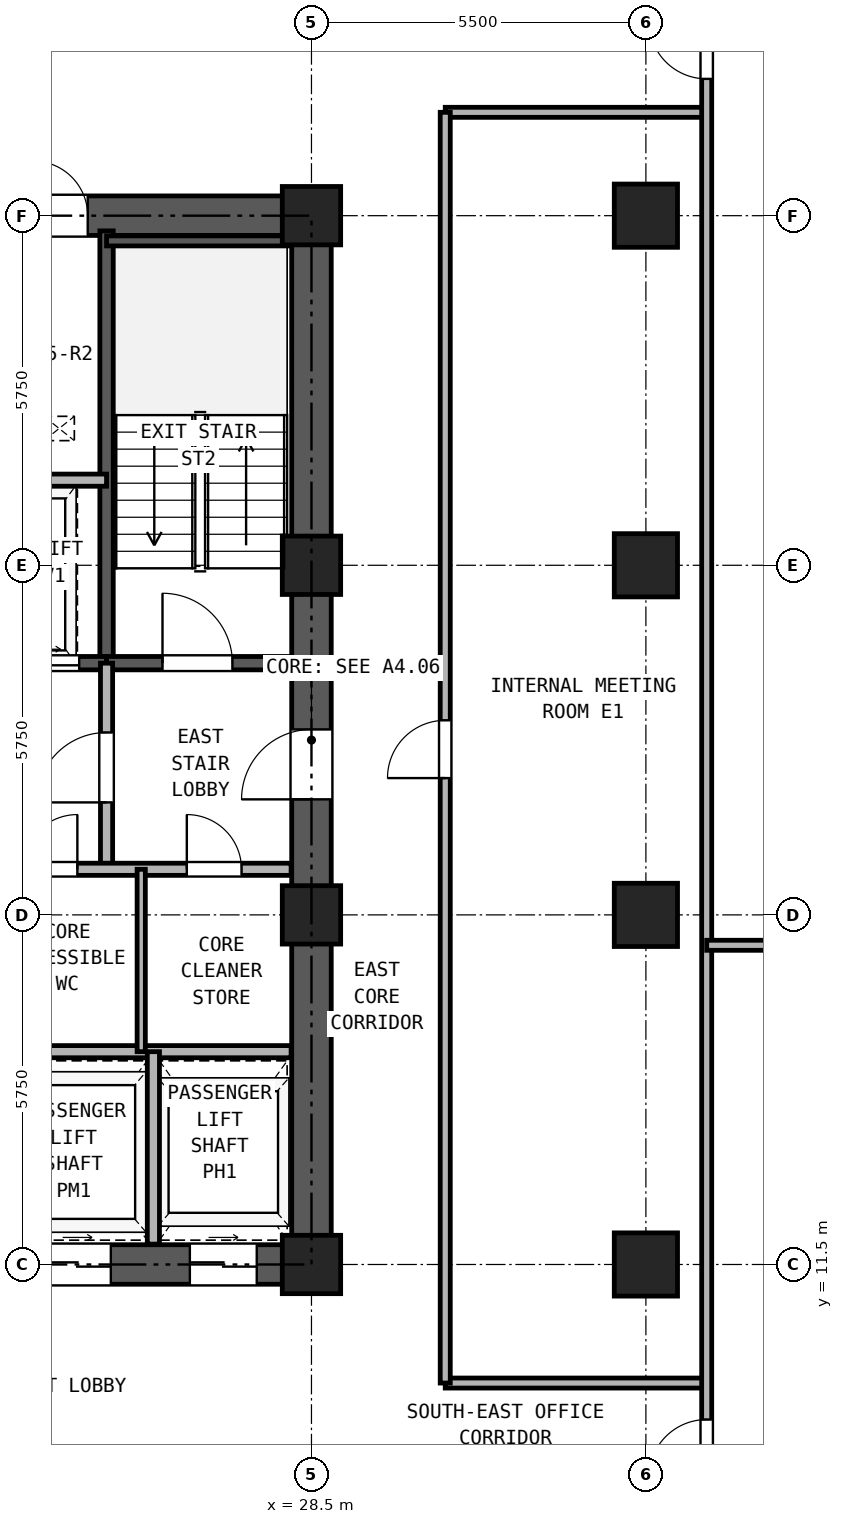
"""IFC4 building model, lengths in metres.
Left out: names, types, materials, properties, quantities, classifications, styles, units other than length and angle.
Written with IfcOpenShell. Run it as: python <this file> out.ifc"""

import sys

from ifc_helpers import new_model, si_unit, direction, frame, frame_2d, origin, origin_2d, place, context, subcontext, project, spatial, rectangle, hollow_rectangle, extrude, source, transform, mapped, element, fill, save


model = new_model("IFC4")
c1 = context("Model", 3, precision=1e-05, world=origin(), true_north=direction((0.0, 1.0)))
c2 = subcontext(c1, "Body", "Model", "MODEL_VIEW")
j1 = project(units=[si_unit("LENGTHUNIT", "METRE"), si_unit("PLANEANGLEUNIT", "RADIAN")], contexts=[c1])
p1 = place(None, origin())
s1 = spatial("IfcSite", under=j1, at=p1, CompositionType="ELEMENT")
p2 = place(p1, origin())
s2 = spatial("IfcBuilding", under=s1, at=p2, CompositionType="ELEMENT")
p3 = place(p2, frame((0.0, 0.0, 58.5)))
s3 = spatial("IfcBuildingStorey", under=s2, at=p3, CompositionType="ELEMENT", Elevation=58.5)
m1 = source(origin(), c2, "Body", "SweptSolid", [
    extrude(hollow_rectangle(XDim=0.96, YDim=0.96, WallThickness=0.06, at=origin_2d()), origin(), (0.0, 0.0, 1.0), 3.32),
])
for number, where, z_axis, x_axis in (
    (1, (28.5, 11.5, 0.0), (0.0, 0.0, 1.0), (1.0, 0.0, 0.0)),
    (2, (28.5, 17.25, 0.0), (0.0, 0.0, 1.0), (1.0, 0.0, 0.0)),
    (3, (28.5, 23.0, 0.0), (0.0, 0.0, 1.0), (1.0, 0.0, 0.0)),
    (4, (28.5, 28.75, 0.0), (0.0, 0.0, 1.0), (1.0, 0.0, 0.0)),
):
    element("IfcColumn", number, at=place(p3, frame(where, z_axis=z_axis, x_axis=x_axis)), inside=s3, PredefinedType="COLUMN", context=c2, shape_type="MappedRepresentation", body=[
        mapped(m1, transform((0.0, 0.0, 0.0), x_axis=(1.0, 0.0, 0.0), y_axis=(0.0, 1.0, 0.0), z_axis=(0.0, 0.0, 1.0), scale=1.0)),
    ])
m2 = source(origin(), c2, "Body", "SweptSolid", [
    extrude(hollow_rectangle(XDim=1.04, YDim=1.04, WallThickness=0.065, at=origin_2d()), origin(), (0.0, 0.0, 1.0), 3.32),
])
for number, where, z_axis, x_axis in (
    (5, (34.0, 11.5, 0.0), (0.0, 0.0, 1.0), (1.0, 0.0, 0.0)),
    (6, (34.0, 17.25, 0.0), (0.0, 0.0, 1.0), (1.0, 0.0, 0.0)),
    (7, (34.0, 23.0, 0.0), (0.0, 0.0, 1.0), (1.0, 0.0, 0.0)),
    (8, (34.0, 28.75, 0.0), (0.0, 0.0, 1.0), (1.0, 0.0, 0.0)),
):
    element("IfcColumn", number, at=place(p3, frame(where, z_axis=z_axis, x_axis=x_axis)), inside=s3, PredefinedType="COLUMN", context=c2, shape_type="MappedRepresentation", body=[
        mapped(m2, transform((0.0, 0.0, 0.0), x_axis=(1.0, 0.0, 0.0), y_axis=(0.0, 1.0, 0.0), z_axis=(0.0, 0.0, 1.0), scale=1.0)),
    ])
p4 = place(p3, frame((18.175, 11.5, 0.0), z_axis=(0.0, 0.0, 1.0), x_axis=(1.0, 0.0, 0.0)))
e9 = element("IfcWall", 9, at=p4, inside=s3, PredefinedType="SHEAR", context=c2, shape_type="SweptSolid", body=[
    extrude(rectangle(XDim=10.65, YDim=0.65, at=frame_2d((5.325, 0.0))), origin(), (0.0, 0.0, 1.0), 3.32),
])
p5 = place(p4, frame((1.195, 0.0, 0.0)))
e10 = element("IfcOpeningElement", 10, at=p5, cuts=e9, PredefinedType="OPENING", context=c2, shape_type="SweptSolid", body=[
    extrude(rectangle(XDim=1.1, YDim=2.25, at=frame_2d((0.55, 1.125))), frame((0.0, 0.335, 0.0), z_axis=(0.0, -1.0, 0.0), x_axis=(1.0, 0.0, 0.0)), (0.0, 0.0, 1.0), 0.67),
])
p6 = place(p4, frame((3.495, 0.0, 0.0)))
e11 = element("IfcOpeningElement", 11, at=p6, cuts=e9, PredefinedType="OPENING", context=c2, shape_type="SweptSolid", body=[
    extrude(rectangle(XDim=1.1, YDim=2.25, at=frame_2d((0.55, 1.125))), frame((0.0, 0.335, 0.0), z_axis=(0.0, -1.0, 0.0), x_axis=(1.0, 0.0, 0.0)), (0.0, 0.0, 1.0), 0.67),
])
p7 = place(p4, frame((5.925, 0.0, 0.0)))
e12 = element("IfcOpeningElement", 12, at=p7, cuts=e9, PredefinedType="OPENING", context=c2, shape_type="SweptSolid", body=[
    extrude(rectangle(XDim=1.1, YDim=2.25, at=frame_2d((0.55, 1.125))), frame((0.0, 0.335, 0.0), z_axis=(0.0, -1.0, 0.0), x_axis=(1.0, 0.0, 0.0)), (0.0, 0.0, 1.0), 0.67),
])
p8 = place(p4, frame((8.325, 0.0, 0.0)))
e13 = element("IfcOpeningElement", 13, at=p8, cuts=e9, PredefinedType="OPENING", context=c2, shape_type="SweptSolid", body=[
    extrude(rectangle(XDim=1.1, YDim=2.25, at=frame_2d((0.55, 1.125))), frame((0.0, 0.335, 0.0), z_axis=(0.0, -1.0, 0.0), x_axis=(1.0, 0.0, 0.0)), (0.0, 0.0, 1.0), 0.67),
])
p9 = place(p3, frame((18.175, 28.75, 0.0), z_axis=(0.0, 0.0, 1.0), x_axis=(1.0, 0.0, 0.0)))
e14 = element("IfcWall", 14, at=p9, inside=s3, PredefinedType="SHEAR", context=c2, shape_type="SweptSolid", body=[
    extrude(rectangle(XDim=10.65, YDim=0.65, at=frame_2d((5.325, 0.0))), origin(), (0.0, 0.0, 1.0), 3.32),
])
p10 = place(p9, frame((4.205, 0.0, 0.0)))
e15 = element("IfcOpeningElement", 15, at=p10, cuts=e14, PredefinedType="OPENING", context=c2, shape_type="SweptSolid", body=[
    extrude(rectangle(XDim=0.9, YDim=2.05, at=frame_2d((0.45, 1.025))), frame((0.0, 0.335, 0.0), z_axis=(0.0, -1.0, 0.0), x_axis=(1.0, 0.0, 0.0)), (0.0, 0.0, 1.0), 0.67),
])
p11 = place(p9, frame((5.745, 0.0, 0.0)))
e16 = element("IfcOpeningElement", 16, at=p11, cuts=e14, PredefinedType="OPENING", context=c2, shape_type="SweptSolid", body=[
    extrude(rectangle(XDim=0.9, YDim=2.05, at=frame_2d((0.45, 1.025))), frame((0.0, 0.335, 0.0), z_axis=(0.0, -1.0, 0.0), x_axis=(1.0, 0.0, 0.0)), (0.0, 0.0, 1.0), 0.67),
])
p12 = place(p3, frame((28.5, 11.825, 0.0), z_axis=(0.0, 0.0, 1.0), x_axis=(0.0, 1.0, 0.0)))
e17 = element("IfcWall", 17, at=p12, inside=s3, PredefinedType="SHEAR", context=c2, shape_type="SweptSolid", body=[
    extrude(rectangle(XDim=16.6, YDim=0.65, at=frame_2d((8.3, 0.0))), origin(), (0.0, 0.0, 1.0), 3.32),
])
p13 = place(p12, frame((7.325, 0.0, 0.0)))
e18 = element("IfcOpeningElement", 18, at=p13, cuts=e17, PredefinedType="OPENING", context=c2, shape_type="SweptSolid", body=[
    extrude(rectangle(XDim=1.15, YDim=2.2, at=frame_2d((0.575, 1.1))), frame((0.0, 0.335, 0.0), z_axis=(0.0, -1.0, 0.0), x_axis=(1.0, 0.0, 0.0)), (0.0, 0.0, 1.0), 0.67),
])
p14 = place(p3, frame((25.13, 21.39, 0.0), z_axis=(0.0, 0.0, 1.0), x_axis=(0.0, 1.0, 0.0)))
e19 = element("IfcWall", 19, at=p14, inside=s3, PredefinedType="SOLIDWALL", context=c2, shape_type="SweptSolid", body=[
    extrude(rectangle(XDim=7.11, YDim=0.22, at=frame_2d((3.555, 0.0))), origin(), (0.0, 0.0, 1.0), 3.32),
])
p15 = place(p3, frame((25.13, 28.335, 0.0), z_axis=(0.0, 0.0, 1.0), x_axis=(1.0, 0.0, 0.0)))
e20 = element("IfcWall", 20, at=p15, inside=s3, PredefinedType="PARTITIONING", context=c2, shape_type="SweptSolid", body=[
    extrude(rectangle(XDim=3.035, YDim=0.165, at=frame_2d((1.518, 0.0))), origin(), (0.0, 0.0, 1.0), 3.32),
])
p16 = place(p3, frame((18.835, 21.39, 0.0), z_axis=(0.0, 0.0, 1.0), x_axis=(1.0, 0.0, 0.0)))
e21 = element("IfcWall", 21, at=p16, inside=s3, PredefinedType="SOLIDWALL", context=c2, shape_type="SweptSolid", body=[
    extrude(rectangle(XDim=6.295, YDim=0.22, at=frame_2d((3.147, 0.0))), origin(), (0.0, 0.0, 1.0), 3.32),
])
p17 = place(p16, frame((1.015, 0.0, 0.0)))
e22 = element("IfcOpeningElement", 22, at=p17, cuts=e21, PredefinedType="OPENING", context=c2, shape_type="SweptSolid", body=[
    extrude(rectangle(XDim=1.15, YDim=2.2, at=frame_2d((0.575, 1.1))), frame((0.0, 0.12, 0.0), z_axis=(0.0, -1.0, 0.0), x_axis=(1.0, 0.0, 0.0)), (0.0, 0.0, 1.0), 0.24),
])
p18 = place(p16, frame((4.745, 0.0, 0.0)))
e23 = element("IfcOpeningElement", 23, at=p18, cuts=e21, PredefinedType="OPENING", context=c2, shape_type="SweptSolid", body=[
    extrude(rectangle(XDim=1.1, YDim=2.25, at=frame_2d((0.55, 1.125))), frame((0.0, 0.12, 0.0), z_axis=(0.0, -1.0, 0.0), x_axis=(1.0, 0.0, 0.0)), (0.0, 0.0, 1.0), 0.24),
])
p19 = place(p3, frame((25.13, 21.39, 0.0), z_axis=(0.0, 0.0, 1.0), x_axis=(1.0, 0.0, 0.0)))
e24 = element("IfcWall", 24, at=p19, inside=s3, PredefinedType="SOLIDWALL", context=c2, shape_type="SweptSolid", body=[
    extrude(rectangle(XDim=3.035, YDim=0.22, at=frame_2d((1.518, 0.0))), origin(), (0.0, 0.0, 1.0), 3.32),
])
p20 = place(p19, frame((0.92, 0.0, 0.0)))
e25 = element("IfcOpeningElement", 25, at=p20, cuts=e24, PredefinedType="OPENING", context=c2, shape_type="SweptSolid", body=[
    extrude(rectangle(XDim=1.15, YDim=2.2, at=frame_2d((0.575, 1.1))), frame((0.0, 0.12, 0.0), z_axis=(0.0, -1.0, 0.0), x_axis=(1.0, 0.0, 0.0)), (0.0, 0.0, 1.0), 0.24),
])
p21 = place(p3, frame((22.11, 24.4, 0.0), z_axis=(0.0, 0.0, 1.0), x_axis=(1.0, 0.0, 0.0)))
e26 = element("IfcWall", 26, at=p21, inside=s3, PredefinedType="PARTITIONING", context=c2, shape_type="SweptSolid", body=[
    extrude(rectangle(XDim=3.02, YDim=0.2, at=frame_2d((1.51, 0.0))), origin(), (0.0, 0.0, 1.0), 3.32),
])
p22 = place(p3, frame((25.13, 18.0, 0.0), z_axis=(0.0, 0.0, 1.0), x_axis=(0.0, 1.0, 0.0)))
e27 = element("IfcWall", 27, at=p22, inside=s3, PredefinedType="PARTITIONING", context=c2, shape_type="SweptSolid", body=[
    extrude(rectangle(XDim=3.39, YDim=0.2, at=frame_2d((1.695, 0.0))), origin(), (0.0, 0.0, 1.0), 3.32),
])
p23 = place(p22, frame((1.1, 0.0, 0.0)))
e28 = element("IfcOpeningElement", 28, at=p23, cuts=e27, PredefinedType="OPENING", context=c2, shape_type="SweptSolid", body=[
    extrude(rectangle(XDim=1.15, YDim=2.2, at=frame_2d((0.575, 1.1))), frame((0.0, 0.11, 0.0), z_axis=(0.0, -1.0, 0.0), x_axis=(1.0, 0.0, 0.0)), (0.0, 0.0, 1.0), 0.22),
])
p24 = place(p3, frame((18.835, 18.0, 0.0), z_axis=(0.0, 0.0, 1.0), x_axis=(1.0, 0.0, 0.0)))
e29 = element("IfcWall", 29, at=p24, inside=s3, PredefinedType="PARTITIONING", context=c2, shape_type="SweptSolid", body=[
    extrude(rectangle(XDim=9.33, YDim=0.2, at=frame_2d((4.665, 0.0))), origin(), (0.0, 0.0, 1.0), 3.32),
])
p25 = place(p24, frame((0.415, 0.0, 0.0)))
e30 = element("IfcOpeningElement", 30, at=p25, cuts=e29, PredefinedType="OPENING", context=c2, shape_type="SweptSolid", body=[
    extrude(rectangle(XDim=1.3, YDim=2.3, at=frame_2d((0.65, 1.15))), frame((0.0, 0.11, 0.0), z_axis=(0.0, -1.0, 0.0), x_axis=(1.0, 0.0, 0.0)), (0.0, 0.0, 1.0), 0.22),
])
p26 = place(p24, frame((2.515, 0.0, 0.0)))
e31 = element("IfcOpeningElement", 31, at=p26, cuts=e29, PredefinedType="OPENING", context=c2, shape_type="SweptSolid", body=[
    extrude(rectangle(XDim=1.3, YDim=2.3, at=frame_2d((0.65, 1.15))), frame((0.0, 0.11, 0.0), z_axis=(0.0, -1.0, 0.0), x_axis=(1.0, 0.0, 0.0)), (0.0, 0.0, 1.0), 0.22),
])
p27 = place(p24, frame((4.915, 0.0, 0.0)))
e32 = element("IfcOpeningElement", 32, at=p27, cuts=e29, PredefinedType="OPENING", context=c2, shape_type="SweptSolid", body=[
    extrude(rectangle(XDim=0.9, YDim=2.05, at=frame_2d((0.45, 1.025))), frame((0.0, 0.11, 0.0), z_axis=(0.0, -1.0, 0.0), x_axis=(1.0, 0.0, 0.0)), (0.0, 0.0, 1.0), 0.22),
])
p28 = place(p24, frame((7.615, 0.0, 0.0)))
e33 = element("IfcOpeningElement", 33, at=p28, cuts=e29, PredefinedType="OPENING", context=c2, shape_type="SweptSolid", body=[
    extrude(rectangle(XDim=0.9, YDim=2.05, at=frame_2d((0.45, 1.025))), frame((0.0, 0.11, 0.0), z_axis=(0.0, -1.0, 0.0), x_axis=(1.0, 0.0, 0.0)), (0.0, 0.0, 1.0), 0.22),
])
p29 = place(p3, frame((18.835, 15.0, 0.0), z_axis=(0.0, 0.0, 1.0), x_axis=(1.0, 0.0, 0.0)))
e34 = element("IfcWall", 34, at=p29, inside=s3, PredefinedType="PARTITIONING", context=c2, shape_type="SweptSolid", body=[
    extrude(rectangle(XDim=9.33, YDim=0.2, at=frame_2d((4.665, 0.0))), origin(), (0.0, 0.0, 1.0), 3.32),
])
p30 = place(p3, frame((25.7, 15.0, 0.0), z_axis=(0.0, 0.0, 1.0), x_axis=(0.0, 1.0, 0.0)))
e35 = element("IfcWall", 35, at=p30, inside=s3, PredefinedType="PARTITIONING", context=c2, shape_type="SweptSolid", body=[
    extrude(rectangle(XDim=3.0, YDim=0.135, at=frame_2d((1.5, 0.0))), origin(), (0.0, 0.0, 1.0), 3.32),
])
p31 = place(p3, frame((25.9, 11.835, 0.0), z_axis=(0.0, 0.0, 1.0), x_axis=(0.0, 1.0, 0.0)))
e36 = element("IfcWall", 36, at=p31, inside=s3, PredefinedType="PARTITIONING", context=c2, shape_type="SweptSolid", body=[
    extrude(rectangle(XDim=3.165, YDim=0.2, at=frame_2d((1.583, 0.0))), origin(), (0.0, 0.0, 1.0), 3.32),
])
for number, where, z_axis, x_axis in (
    (37, (30.7, 9.55, 0.0), (0.0, 0.0, 1.0), (1.0, 0.0, 0.0)),
    (38, (30.7, 30.45, 0.0), (0.0, 0.0, 1.0), (1.0, 0.0, 0.0)),
):
    element("IfcWall", number, at=place(p3, frame(where, z_axis=z_axis, x_axis=x_axis)), inside=s3, PredefinedType="PARTITIONING", context=c2, shape_type="SweptSolid", body=[
        extrude(rectangle(XDim=4.3, YDim=0.165, at=frame_2d((2.15, 0.0))), origin(), (0.0, 0.0, 1.0), 3.32),
    ])
p32 = place(p3, frame((30.7, 9.55, 0.0), z_axis=(0.0, 0.0, 1.0), x_axis=(0.0, 1.0, 0.0)))
e39 = element("IfcWall", 39, at=p32, inside=s3, PredefinedType="PARTITIONING", context=c2, shape_type="SweptSolid", body=[
    extrude(rectangle(XDim=20.9, YDim=0.165, at=frame_2d((10.45, 0.0))), origin(), (0.0, 0.0, 1.0), 3.32),
])
p33 = place(p32, frame((9.95, 0.0, 0.0)))
e40 = element("IfcOpeningElement", 40, at=p33, cuts=e39, PredefinedType="OPENING", context=c2, shape_type="SweptSolid", body=[
    extrude(rectangle(XDim=0.95, YDim=2.15, at=frame_2d((0.475, 1.075))), frame((0.0, 0.093, 0.0), z_axis=(0.0, -1.0, 0.0), x_axis=(1.0, 0.0, 0.0)), (0.0, 0.0, 1.0), 0.185),
])
p34 = place(p3, frame((35.0, 0.16, 0.0), z_axis=(0.0, 0.0, 1.0), x_axis=(0.0, 1.0, 0.0)))
e41 = element("IfcWall", 41, at=p34, inside=s3, PredefinedType="PARTITIONING", context=c2, shape_type="SweptSolid", body=[
    extrude(rectangle(XDim=40.18, YDim=0.165, at=frame_2d((20.09, 0.0))), origin(), (0.0, 0.0, 1.0), 3.32),
])
p35 = place(p34, frame((7.84, 0.0, 0.0)))
e42 = element("IfcOpeningElement", 42, at=p35, cuts=e41, PredefinedType="OPENING", context=c2, shape_type="SweptSolid", body=[
    extrude(rectangle(XDim=0.95, YDim=2.15, at=frame_2d((0.475, 1.075))), frame((0.0, 0.093, 0.0), z_axis=(0.0, -1.0, 0.0), x_axis=(1.0, 0.0, 0.0)), (0.0, 0.0, 1.0), 0.185),
])
p36 = place(p34, frame((30.84, 0.0, 0.0)))
e43 = element("IfcOpeningElement", 43, at=p36, cuts=e41, PredefinedType="OPENING", context=c2, shape_type="SweptSolid", body=[
    extrude(rectangle(XDim=0.95, YDim=2.15, at=frame_2d((0.475, 1.075))), frame((0.0, 0.093, 0.0), z_axis=(0.0, -1.0, 0.0), x_axis=(1.0, 0.0, 0.0)), (0.0, 0.0, 1.0), 0.185),
])
p37 = place(p3, frame((35.0, 16.75, 0.0), z_axis=(0.0, 0.0, 1.0), x_axis=(1.0, 0.0, 0.0)))
e44 = element("IfcWall", 44, at=p37, inside=s3, PredefinedType="PARTITIONING", context=c2, shape_type="SweptSolid", body=[
    extrude(rectangle(XDim=11.84, YDim=0.165, at=frame_2d((5.92, 0.0))), origin(), (0.0, 0.0, 1.0), 3.32),
])
p38 = place(p20, frame((1.15, 0.0, 0.0), z_axis=(0.0, 0.0, 1.0), x_axis=(-1.0, 0.0, 0.0)))
e45 = element("IfcDoor", 45, at=p38, inside=s3, OperationType="SINGLE_SWING_LEFT", PredefinedType="DOOR", context=c2, shape_type="SweptSolid", body=[
    extrude(rectangle(XDim=1.15, YDim=2.2, at=frame_2d((0.575, 1.1))), frame((0.0, 0.025, 0.0), z_axis=(0.0, -1.0, 0.0), x_axis=(1.0, 0.0, 0.0)), (0.0, 0.0, 1.0), 0.05),
])
fill(e25, e45)
p39 = place(p18, frame((1.1, 0.0, 0.0), z_axis=(0.0, 0.0, 1.0), x_axis=(-1.0, 0.0, 0.0)))
e46 = element("IfcDoor", 46, at=p39, inside=s3, OperationType="DOUBLE_DOOR_SLIDING", PredefinedType="DOOR", context=c2, shape_type="SweptSolid", body=[
    extrude(rectangle(XDim=1.1, YDim=2.25, at=frame_2d((0.55, 1.125))), frame((0.0, 0.025, 0.0), z_axis=(0.0, -1.0, 0.0), x_axis=(1.0, 0.0, 0.0)), (0.0, 0.0, 1.0), 0.05),
])
fill(e23, e46)
p40 = place(p23, origin())
e47 = element("IfcDoor", 47, at=p40, inside=s3, OperationType="SINGLE_SWING_LEFT", PredefinedType="DOOR", context=c2, shape_type="SweptSolid", body=[
    extrude(rectangle(XDim=1.15, YDim=2.2, at=frame_2d((0.575, 1.1))), frame((0.0, 0.025, 0.0), z_axis=(0.0, -1.0, 0.0), x_axis=(1.0, 0.0, 0.0)), (0.0, 0.0, 1.0), 0.05),
])
fill(e28, e47)
p41 = place(p27, frame((0.9, 0.0, 0.0), z_axis=(0.0, 0.0, 1.0), x_axis=(-1.0, 0.0, 0.0)))
e48 = element("IfcDoor", 48, at=p41, inside=s3, OperationType="SINGLE_SWING_RIGHT", PredefinedType="DOOR", context=c2, shape_type="SweptSolid", body=[
    extrude(rectangle(XDim=0.9, YDim=2.05, at=frame_2d((0.45, 1.025))), frame((0.0, 0.025, 0.0), z_axis=(0.0, -1.0, 0.0), x_axis=(1.0, 0.0, 0.0)), (0.0, 0.0, 1.0), 0.05),
])
fill(e32, e48)
p42 = place(p28, frame((0.9, 0.0, 0.0), z_axis=(0.0, 0.0, 1.0), x_axis=(-1.0, 0.0, 0.0)))
e49 = element("IfcDoor", 49, at=p42, inside=s3, OperationType="SINGLE_SWING_LEFT", PredefinedType="DOOR", context=c2, shape_type="SweptSolid", body=[
    extrude(rectangle(XDim=0.9, YDim=2.05, at=frame_2d((0.45, 1.025))), frame((0.0, 0.025, 0.0), z_axis=(0.0, -1.0, 0.0), x_axis=(1.0, 0.0, 0.0)), (0.0, 0.0, 1.0), 0.05),
])
fill(e33, e49)
p43 = place(p13, origin())
e50 = element("IfcDoor", 50, at=p43, inside=s3, OperationType="SINGLE_SWING_LEFT", PredefinedType="DOOR", context=c2, shape_type="SweptSolid", body=[
    extrude(rectangle(XDim=1.15, YDim=2.2, at=frame_2d((0.575, 1.1))), frame((0.0, 0.025, 0.0), z_axis=(0.0, -1.0, 0.0), x_axis=(1.0, 0.0, 0.0)), (0.0, 0.0, 1.0), 0.05),
])
fill(e18, e50)
p44 = place(p11, origin())
e51 = element("IfcDoor", 51, at=p44, inside=s3, OperationType="SINGLE_SWING_LEFT", PredefinedType="DOOR", context=c2, shape_type="SweptSolid", body=[
    extrude(rectangle(XDim=0.9, YDim=2.05, at=frame_2d((0.45, 1.025))), frame((0.0, 0.025, 0.0), z_axis=(0.0, -1.0, 0.0), x_axis=(1.0, 0.0, 0.0)), (0.0, 0.0, 1.0), 0.05),
])
fill(e16, e51)
p45 = place(p7, frame((1.1, 0.0, 0.0), z_axis=(0.0, 0.0, 1.0), x_axis=(-1.0, 0.0, 0.0)))
e52 = element("IfcDoor", 52, at=p45, inside=s3, OperationType="DOUBLE_DOOR_SLIDING", PredefinedType="DOOR", context=c2, shape_type="SweptSolid", body=[
    extrude(rectangle(XDim=1.1, YDim=2.25, at=frame_2d((0.55, 1.125))), frame((0.0, 0.025, 0.0), z_axis=(0.0, -1.0, 0.0), x_axis=(1.0, 0.0, 0.0)), (0.0, 0.0, 1.0), 0.05),
])
fill(e12, e52)
p46 = place(p8, frame((1.1, 0.0, 0.0), z_axis=(0.0, 0.0, 1.0), x_axis=(-1.0, 0.0, 0.0)))
e53 = element("IfcDoor", 53, at=p46, inside=s3, OperationType="DOUBLE_DOOR_SLIDING", PredefinedType="DOOR", context=c2, shape_type="SweptSolid", body=[
    extrude(rectangle(XDim=1.1, YDim=2.25, at=frame_2d((0.55, 1.125))), frame((0.0, 0.025, 0.0), z_axis=(0.0, -1.0, 0.0), x_axis=(1.0, 0.0, 0.0)), (0.0, 0.0, 1.0), 0.05),
])
fill(e13, e53)
p47 = place(p35, origin())
e54 = element("IfcDoor", 54, at=p47, inside=s3, OperationType="SINGLE_SWING_LEFT", PredefinedType="DOOR", context=c2, shape_type="SweptSolid", body=[
    extrude(rectangle(XDim=0.95, YDim=2.15, at=frame_2d((0.475, 1.075))), frame((0.0, 0.025, 0.0), z_axis=(0.0, -1.0, 0.0), x_axis=(1.0, 0.0, 0.0)), (0.0, 0.0, 1.0), 0.05),
])
fill(e42, e54)
p48 = place(p36, origin())
e55 = element("IfcDoor", 55, at=p48, inside=s3, OperationType="SINGLE_SWING_RIGHT", PredefinedType="DOOR", context=c2, shape_type="SweptSolid", body=[
    extrude(rectangle(XDim=0.95, YDim=2.15, at=frame_2d((0.475, 1.075))), frame((0.0, 0.025, 0.0), z_axis=(0.0, -1.0, 0.0), x_axis=(1.0, 0.0, 0.0)), (0.0, 0.0, 1.0), 0.05),
])
fill(e43, e55)
p49 = place(p33, origin())
e56 = element("IfcDoor", 56, at=p49, inside=s3, OperationType="SINGLE_SWING_LEFT", PredefinedType="DOOR", context=c2, shape_type="SweptSolid", body=[
    extrude(rectangle(XDim=0.95, YDim=2.15, at=frame_2d((0.475, 1.075))), frame((0.0, 0.025, 0.0), z_axis=(0.0, -1.0, 0.0), x_axis=(1.0, 0.0, 0.0)), (0.0, 0.0, 1.0), 0.05),
])
fill(e40, e56)
save(model, sys.argv[1])
